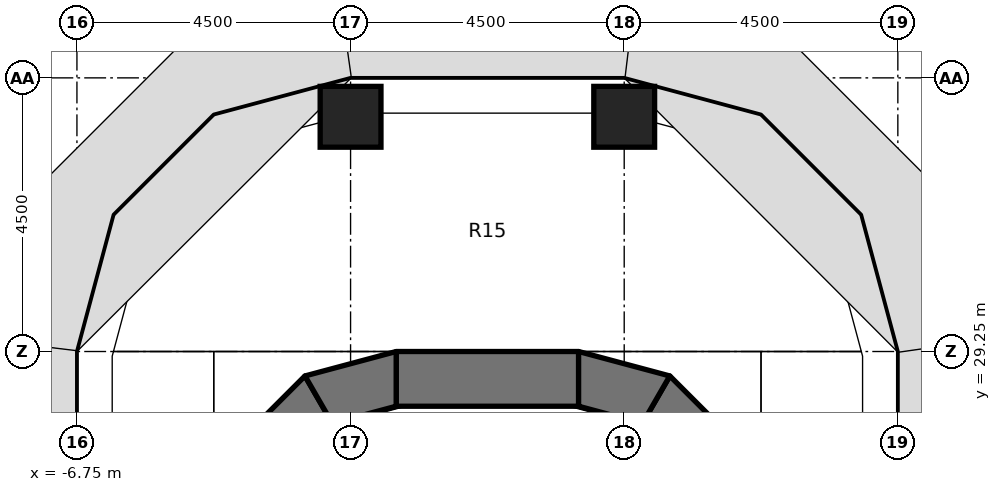
"""IFC4 building model, lengths in metres.
Left out: names, types, materials, properties, quantities, classifications, styles, units other than length and angle.
Written with IfcOpenShell. Run it as: python <this file> out.ifc"""

import sys

from ifc_helpers import new_model, si_unit, direction, frame, frame_2d, origin, origin_2d, place, context, subcontext, project, spatial, polyline, rectangle, outline, extrude, element, save


model = new_model("IFC4")
c1 = context("Model", 3, precision=1e-05, world=origin(), true_north=direction((0.0, 1.0)))
c2 = subcontext(c1, "Body", "Model", "MODEL_VIEW")
j1 = project(units=[si_unit("LENGTHUNIT", "METRE"), si_unit("PLANEANGLEUNIT", "RADIAN")], contexts=[c1])
p1 = place(None, origin())
s1 = spatial("IfcSite", under=j1, at=p1, CompositionType="ELEMENT")
p2 = place(p1, origin())
s2 = spatial("IfcBuilding", under=s1, at=p2, CompositionType="ELEMENT")
p3 = place(p2, frame((0.0, 0.0, 31.2)))
s3 = spatial("IfcBuildingStorey", under=s2, at=p3, CompositionType="ELEMENT", Elevation=31.2)
for number, where, z_axis, x_axis in (
    (1, (-2.25, 33.11, 0.0), (0.0, 0.0, 1.0), (1.0, 0.0, 0.0)),
    (2, (2.25, 33.11, 0.0), (0.0, 0.0, 1.0), (1.0, 0.0, 0.0)),
):
    element("IfcColumn", number, at=place(p3, frame(where, z_axis=z_axis, x_axis=x_axis)), inside=s3, PredefinedType="COLUMN", context=c2, shape_type="SweptSolid", body=[
        extrude(rectangle(XDim=1.0, YDim=1.0, at=origin_2d()), origin(), (0.0, 0.0, 1.0), 4.05),
    ])
p4 = place(p3, frame((-1.5, 28.8, 0.0), z_axis=(0.0, 0.0, 1.0), x_axis=(1.0, 0.0, 0.0)))
e3 = element("IfcWall", 3, at=p4, inside=s3, PredefinedType="SHEAR", context=c2, shape_type="SweptSolid", body=[
    extrude(rectangle(XDim=3.0, YDim=0.9, at=frame_2d((1.5, 0.0))), origin(), (0.0, 0.0, 1.0), 4.2),
])
p5 = place(p3, origin())
e4 = element("IfcWall", 4, at=p5, inside=s3, PredefinedType="SHEAR", context=c2, shape_type="SweptSolid", body=[
    extrude(outline(polyline([(-4.098, 27.75), (-3.0, 28.848), (-2.55, 28.069), (-3.319, 27.3), (-4.098, 27.75)])), origin(), (0.0, 0.0, 1.0), 4.2),
])
p6 = place(p3, origin())
e5 = element("IfcWall", 5, at=p6, inside=s3, PredefinedType="SHEAR", context=c2, shape_type="SweptSolid", body=[
    extrude(outline(polyline([(-3.0, 28.848), (-1.5, 29.25), (-1.5, 28.35), (-2.55, 28.069), (-3.0, 28.848)])), origin(), (0.0, 0.0, 1.0), 4.2),
])
p7 = place(p3, origin())
e6 = element("IfcWall", 6, at=p7, inside=s3, PredefinedType="SHEAR", context=c2, shape_type="SweptSolid", body=[
    extrude(outline(polyline([(4.098, 27.75), (3.0, 28.848), (2.55, 28.069), (3.319, 27.3), (4.098, 27.75)])), origin(), (0.0, 0.0, 1.0), 4.2),
])
p8 = place(p3, origin())
e7 = element("IfcWall", 7, at=p8, inside=s3, PredefinedType="SHEAR", context=c2, shape_type="SweptSolid", body=[
    extrude(outline(polyline([(3.0, 28.848), (1.5, 29.25), (1.5, 28.35), (2.55, 28.069), (3.0, 28.848)])), origin(), (0.0, 0.0, 1.0), 4.2),
])
save(model, sys.argv[1])
